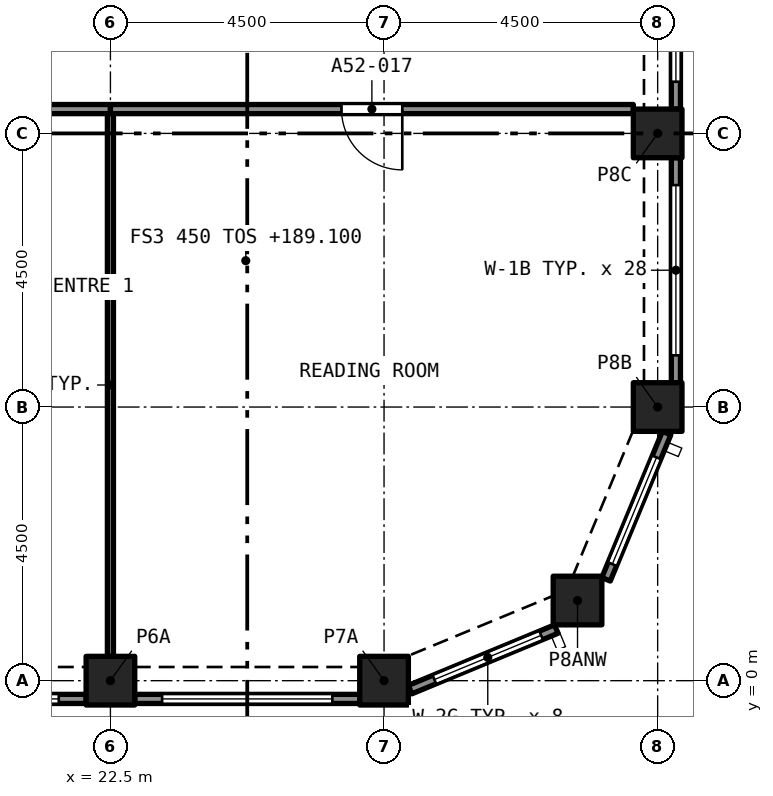
"""IFC4 building model, lengths in metres.
Left out: names, types, materials, properties, quantities, classifications, styles, units other than length and angle.
Written with IfcOpenShell. Run it as: python <this file> out.ifc"""

import sys

from ifc_helpers import new_model, si_unit, direction, frame, frame_2d, origin, origin_2d, place, context, subcontext, project, spatial, rectangle, extrude, element, fill, save


model = new_model("IFC4")
c1 = context("Model", 3, precision=1e-05, world=origin(), true_north=direction((0.0, 1.0)))
c2 = subcontext(c1, "Body", "Model", "MODEL_VIEW")
j1 = project(units=[si_unit("LENGTHUNIT", "METRE"), si_unit("PLANEANGLEUNIT", "RADIAN")], contexts=[c1])
p1 = place(None, origin())
s1 = spatial("IfcSite", under=j1, at=p1, CompositionType="ELEMENT")
p2 = place(p1, origin())
s2 = spatial("IfcBuilding", under=s1, at=p2, CompositionType="ELEMENT")
p3 = place(p2, frame((0.0, 0.0, 189.1)))
s3 = spatial("IfcBuildingStorey", under=s2, at=p3, CompositionType="ELEMENT", Elevation=189.1)
for number, where, z_axis, x_axis in (
    (1, (22.5, 0.0, 0.0), (0.0, 0.0, 1.0), (1.0, 0.0, 0.0)),
    (2, (27.0, 0.0, 0.0), (0.0, 0.0, 1.0), (1.0, 0.0, 0.0)),
    (3, (30.182, 1.318, 0.0), (0.0, 0.0, 1.0), (1.0, 0.0, 0.0)),
    (4, (31.5, 4.5, 0.0), (0.0, 0.0, 1.0), (1.0, 0.0, 0.0)),
    (5, (31.5, 9.0, 0.0), (0.0, 0.0, 1.0), (1.0, 0.0, 0.0)),
):
    element("IfcColumn", number, at=place(p3, frame(where, z_axis=z_axis, x_axis=x_axis)), inside=s3, PredefinedType="COLUMN", context=c2, shape_type="SweptSolid", body=[
        extrude(rectangle(XDim=0.8, YDim=0.8, at=origin_2d()), origin(), (0.0, 0.0, 1.0), 3.2),
    ])
p4 = place(p3, frame((29.833, 0.849, 0.0), z_axis=(0.0, 0.0, 1.0), x_axis=(-0.923885342263, -0.382669406082, 0.0)))
e6 = element("IfcWall", 6, at=p4, inside=s3, PredefinedType="SOLIDWALL", context=c2, shape_type="SweptSolid", body=[
    extrude(rectangle(XDim=2.602, YDim=0.15, at=frame_2d((1.301, 0.0))), origin(), (0.0, 0.0, 1.0), 3.2),
])
p5 = place(p4, frame((0.27, 0.0, 0.45)))
e7 = element("IfcOpeningElement", 7, at=p5, cuts=e6, PredefinedType="OPENING", context=c2, shape_type="SweptSolid", body=[
    extrude(rectangle(XDim=1.9, YDim=1.95, at=frame_2d((0.95, 0.975))), frame((0.0, 0.085, 0.0), z_axis=(0.0, -1.0, 0.0), x_axis=(1.0, 0.0, 0.0)), (0.0, 0.0, 1.0), 0.17),
])
p6 = place(p3, frame((31.647, 4.071, 0.0), z_axis=(0.0, 0.0, 1.0), x_axis=(-0.382669406082, -0.923885342263, 0.0)))
e8 = element("IfcWall", 8, at=p6, inside=s3, PredefinedType="SOLIDWALL", context=c2, shape_type="SweptSolid", body=[
    extrude(rectangle(XDim=2.602, YDim=0.15, at=frame_2d((1.301, 0.0))), origin(), (0.0, 0.0, 1.0), 3.2),
])
p7 = place(p6, frame((0.432, 0.0, 0.45)))
e9 = element("IfcOpeningElement", 9, at=p7, cuts=e8, PredefinedType="OPENING", context=c2, shape_type="SweptSolid", body=[
    extrude(rectangle(XDim=1.9, YDim=1.95, at=frame_2d((0.95, 0.975))), frame((0.0, 0.085, 0.0), z_axis=(0.0, -1.0, 0.0), x_axis=(1.0, 0.0, 0.0)), (0.0, 0.0, 1.0), 0.17),
])
p8 = place(p3, frame((31.8, 8.6, 0.0), z_axis=(0.0, 0.0, 1.0), x_axis=(0.0, -1.0, 0.0)))
e10 = element("IfcWall", 10, at=p8, inside=s3, PredefinedType="SOLIDWALL", context=c2, shape_type="SweptSolid", body=[
    extrude(rectangle(XDim=3.7, YDim=0.15, at=frame_2d((1.85, 0.0))), origin(), (0.0, 0.0, 1.0), 3.2),
])
p9 = place(p8, frame((0.45, 0.0, 0.45)))
e11 = element("IfcOpeningElement", 11, at=p9, cuts=e10, PredefinedType="OPENING", context=c2, shape_type="SweptSolid", body=[
    extrude(rectangle(XDim=2.8, YDim=1.95, at=frame_2d((1.4, 0.975))), frame((0.0, 0.085, 0.0), z_axis=(0.0, -1.0, 0.0), x_axis=(1.0, 0.0, 0.0)), (0.0, 0.0, 1.0), 0.17),
])
p10 = place(p3, frame((31.8, 13.1, 0.0), z_axis=(0.0, 0.0, 1.0), x_axis=(0.0, -1.0, 0.0)))
e12 = element("IfcWall", 12, at=p10, inside=s3, PredefinedType="SOLIDWALL", context=c2, shape_type="SweptSolid", body=[
    extrude(rectangle(XDim=3.7, YDim=0.15, at=frame_2d((1.85, 0.0))), origin(), (0.0, 0.0, 1.0), 3.2),
])
p11 = place(p10, frame((0.45, 0.0, 0.45)))
e13 = element("IfcOpeningElement", 13, at=p11, cuts=e12, PredefinedType="OPENING", context=c2, shape_type="SweptSolid", body=[
    extrude(rectangle(XDim=2.8, YDim=1.95, at=frame_2d((1.4, 0.975))), frame((0.0, 0.085, 0.0), z_axis=(0.0, -1.0, 0.0), x_axis=(1.0, 0.0, 0.0)), (0.0, 0.0, 1.0), 0.17),
])
p12 = place(p3, frame((22.1, -0.3, 0.0), z_axis=(0.0, 0.0, 1.0), x_axis=(-1.0, 0.0, 0.0)))
e14 = element("IfcWall", 14, at=p12, inside=s3, PredefinedType="SOLIDWALL", context=c2, shape_type="SweptSolid", body=[
    extrude(rectangle(XDim=3.7, YDim=0.15, at=frame_2d((1.85, 0.0))), origin(), (0.0, 0.0, 1.0), 3.2),
])
p13 = place(p12, frame((0.45, 0.0, 0.45)))
e15 = element("IfcOpeningElement", 15, at=p13, cuts=e14, PredefinedType="OPENING", context=c2, shape_type="SweptSolid", body=[
    extrude(rectangle(XDim=2.8, YDim=1.95, at=frame_2d((1.4, 0.975))), frame((0.0, 0.085, 0.0), z_axis=(0.0, -1.0, 0.0), x_axis=(1.0, 0.0, 0.0)), (0.0, 0.0, 1.0), 0.17),
])
p14 = place(p3, frame((26.6, -0.3, 0.0), z_axis=(0.0, 0.0, 1.0), x_axis=(-1.0, 0.0, 0.0)))
e16 = element("IfcWall", 16, at=p14, inside=s3, PredefinedType="SOLIDWALL", context=c2, shape_type="SweptSolid", body=[
    extrude(rectangle(XDim=3.7, YDim=0.15, at=frame_2d((1.85, 0.0))), origin(), (0.0, 0.0, 1.0), 3.2),
])
p15 = place(p14, frame((0.45, 0.0, 0.45)))
e17 = element("IfcOpeningElement", 17, at=p15, cuts=e16, PredefinedType="OPENING", context=c2, shape_type="SweptSolid", body=[
    extrude(rectangle(XDim=2.8, YDim=1.95, at=frame_2d((1.4, 0.975))), frame((0.0, 0.085, 0.0), z_axis=(0.0, -1.0, 0.0), x_axis=(1.0, 0.0, 0.0)), (0.0, 0.0, 1.0), 0.17),
])
p16 = place(p3, frame((22.5, 0.4, 0.0), z_axis=(0.0, 0.0, 1.0), x_axis=(0.0, 1.0, 0.0)))
e18 = element("IfcWall", 18, at=p16, inside=s3, PredefinedType="PARTITIONING", context=c2, shape_type="SweptSolid", body=[
    extrude(rectangle(XDim=8.925, YDim=0.1, at=frame_2d((4.462, 0.0))), origin(), (0.0, 0.0, 1.0), 2.75),
])
p17 = place(p3, frame((22.5, 9.4, 0.0), z_axis=(0.0, 0.0, 1.0), x_axis=(-1.0, 0.0, 0.0)))
e19 = element("IfcWall", 19, at=p17, inside=s3, PredefinedType="PARTITIONING", context=c2, shape_type="SweptSolid", body=[
    extrude(rectangle(XDim=4.1, YDim=0.15, at=frame_2d((2.05, 0.0))), origin(), (0.0, 0.0, 1.0), 2.75),
])
p18 = place(p17, frame((1.75, 0.0, 0.0)))
e20 = element("IfcOpeningElement", 20, at=p18, cuts=e19, PredefinedType="OPENING", context=c2, shape_type="SweptSolid", body=[
    extrude(rectangle(XDim=1.0, YDim=2.1, at=frame_2d((0.5, 1.05))), frame((0.0, 0.085, 0.0), z_axis=(0.0, -1.0, 0.0), x_axis=(1.0, 0.0, 0.0)), (0.0, 0.0, 1.0), 0.17),
])
p19 = place(p3, frame((31.1, 9.4, 0.0), z_axis=(0.0, 0.0, 1.0), x_axis=(-1.0, 0.0, 0.0)))
e21 = element("IfcWall", 21, at=p19, inside=s3, PredefinedType="PARTITIONING", context=c2, shape_type="SweptSolid", body=[
    extrude(rectangle(XDim=8.6, YDim=0.15, at=frame_2d((4.3, 0.0))), origin(), (0.0, 0.0, 1.0), 2.75),
])
p20 = place(p19, frame((3.8, 0.0, 0.0)))
e22 = element("IfcOpeningElement", 22, at=p20, cuts=e21, PredefinedType="OPENING", context=c2, shape_type="SweptSolid", body=[
    extrude(rectangle(XDim=1.0, YDim=2.1, at=frame_2d((0.5, 1.05))), frame((0.0, 0.085, 0.0), z_axis=(0.0, -1.0, 0.0), x_axis=(1.0, 0.0, 0.0)), (0.0, 0.0, 1.0), 0.17),
])
p21 = place(p5, origin())
e23 = element("IfcWindow", 23, at=p21, inside=s3, PartitioningType="SINGLE_PANEL", PredefinedType="WINDOW", context=c2, shape_type="SweptSolid", body=[
    extrude(rectangle(XDim=1.9, YDim=1.95, at=frame_2d((0.95, 0.975))), frame((0.0, 0.03, 0.0), z_axis=(0.0, -1.0, 0.0), x_axis=(1.0, 0.0, 0.0)), (0.0, 0.0, 1.0), 0.06),
])
fill(e7, e23)
p22 = place(p7, origin())
e24 = element("IfcWindow", 24, at=p22, inside=s3, PartitioningType="SINGLE_PANEL", PredefinedType="WINDOW", context=c2, shape_type="SweptSolid", body=[
    extrude(rectangle(XDim=1.9, YDim=1.95, at=frame_2d((0.95, 0.975))), frame((0.0, 0.03, 0.0), z_axis=(0.0, -1.0, 0.0), x_axis=(1.0, 0.0, 0.0)), (0.0, 0.0, 1.0), 0.06),
])
fill(e9, e24)
p23 = place(p9, origin())
e25 = element("IfcWindow", 25, at=p23, inside=s3, PartitioningType="SINGLE_PANEL", PredefinedType="WINDOW", context=c2, shape_type="SweptSolid", body=[
    extrude(rectangle(XDim=2.8, YDim=1.95, at=frame_2d((1.4, 0.975))), frame((0.0, 0.03, 0.0), z_axis=(0.0, -1.0, 0.0), x_axis=(1.0, 0.0, 0.0)), (0.0, 0.0, 1.0), 0.06),
])
fill(e11, e25)
p24 = place(p11, origin())
e26 = element("IfcWindow", 26, at=p24, inside=s3, PartitioningType="SINGLE_PANEL", PredefinedType="WINDOW", context=c2, shape_type="SweptSolid", body=[
    extrude(rectangle(XDim=2.8, YDim=1.95, at=frame_2d((1.4, 0.975))), frame((0.0, 0.03, 0.0), z_axis=(0.0, -1.0, 0.0), x_axis=(1.0, 0.0, 0.0)), (0.0, 0.0, 1.0), 0.06),
])
fill(e13, e26)
p25 = place(p13, origin())
e27 = element("IfcWindow", 27, at=p25, inside=s3, PartitioningType="SINGLE_PANEL", PredefinedType="WINDOW", context=c2, shape_type="SweptSolid", body=[
    extrude(rectangle(XDim=2.8, YDim=1.95, at=frame_2d((1.4, 0.975))), frame((0.0, 0.03, 0.0), z_axis=(0.0, -1.0, 0.0), x_axis=(1.0, 0.0, 0.0)), (0.0, 0.0, 1.0), 0.06),
])
fill(e15, e27)
p26 = place(p15, origin())
e28 = element("IfcWindow", 28, at=p26, inside=s3, PartitioningType="SINGLE_PANEL", PredefinedType="WINDOW", context=c2, shape_type="SweptSolid", body=[
    extrude(rectangle(XDim=2.8, YDim=1.95, at=frame_2d((1.4, 0.975))), frame((0.0, 0.03, 0.0), z_axis=(0.0, -1.0, 0.0), x_axis=(1.0, 0.0, 0.0)), (0.0, 0.0, 1.0), 0.06),
])
fill(e17, e28)
p27 = place(p20, origin())
e29 = element("IfcDoor", 29, at=p27, inside=s3, OperationType="SINGLE_SWING_RIGHT", PredefinedType="DOOR", context=c2, shape_type="SweptSolid", body=[
    extrude(rectangle(XDim=1.0, YDim=2.1, at=frame_2d((0.5, 1.05))), frame((0.0, 0.025, 0.0), z_axis=(0.0, -1.0, 0.0), x_axis=(1.0, 0.0, 0.0)), (0.0, 0.0, 1.0), 0.05),
])
fill(e22, e29)
save(model, sys.argv[1])
